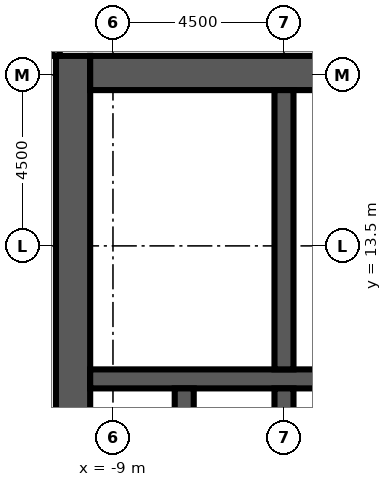
"""IFC4 building model, lengths in metres.
Left out: names, types, materials, properties, quantities, classifications, styles, units other than length and angle.
Written with IfcOpenShell. Run it as: python <this file> out.ifc"""

import sys

from ifc_helpers import new_model, si_unit, direction, frame, frame_2d, origin, place, context, subcontext, project, spatial, rectangle, extrude, element, fill, save


model = new_model("IFC4")
c1 = context("Model", 3, precision=1e-05, world=origin(), true_north=direction((0.0, 1.0)))
c2 = subcontext(c1, "Body", "Model", "MODEL_VIEW")
j1 = project(units=[si_unit("LENGTHUNIT", "METRE"), si_unit("PLANEANGLEUNIT", "RADIAN")], contexts=[c1])
p1 = place(None, origin())
s1 = spatial("IfcSite", under=j1, at=p1, CompositionType="ELEMENT")
p2 = place(p1, origin())
s2 = spatial("IfcBuilding", under=s1, at=p2, CompositionType="ELEMENT")
p3 = place(p2, frame((0.0, 0.0, 141.3)))
s3 = spatial("IfcBuildingStorey", under=s2, at=p3, CompositionType="ELEMENT", Elevation=141.3)
p4 = place(p3, frame((-10.05, -9.0, 0.0), z_axis=(0.0, 0.0, 1.0), x_axis=(0.0, 1.0, 0.0)))
e1 = element("IfcWall", 1, at=p4, inside=s3, PredefinedType="SHEAR", context=c2, shape_type="SweptSolid", body=[
    extrude(rectangle(XDim=27.5, YDim=0.9, at=frame_2d((13.75, 0.0))), origin(), (0.0, 0.0, 1.0), 4.1),
])
p5 = place(p4, frame((12.55, 0.0, 0.0)))
e2 = element("IfcOpeningElement", 2, at=p5, cuts=e1, PredefinedType="OPENING", context=c2, shape_type="SweptSolid", body=[
    extrude(rectangle(XDim=2.4, YDim=2.4, at=frame_2d((1.2, 1.2))), frame((0.0, 0.46, 0.0), z_axis=(0.0, -1.0, 0.0), x_axis=(1.0, 0.0, 0.0)), (0.0, 0.0, 1.0), 0.92),
])
p6 = place(p4, frame((6.825, 0.0, 0.0)))
e3 = element("IfcOpeningElement", 3, at=p6, cuts=e1, PredefinedType="OPENING", context=c2, shape_type="SweptSolid", body=[
    extrude(rectangle(XDim=1.2, YDim=2.1, at=frame_2d((0.6, 1.05))), frame((0.0, 0.46, 0.0), z_axis=(0.0, -1.0, 0.0), x_axis=(1.0, 0.0, 0.0)), (0.0, 0.0, 1.0), 0.92),
])
p7 = place(p4, frame((19.475, 0.0, 0.0)))
e4 = element("IfcOpeningElement", 4, at=p7, cuts=e1, PredefinedType="OPENING", context=c2, shape_type="SweptSolid", body=[
    extrude(rectangle(XDim=1.2, YDim=2.1, at=frame_2d((0.6, 1.05))), frame((0.0, 0.46, 0.0), z_axis=(0.0, -1.0, 0.0), x_axis=(1.0, 0.0, 0.0)), (0.0, 0.0, 1.0), 0.92),
])
p8 = place(p3, frame((-9.6, 18.05, 0.0), z_axis=(0.0, 0.0, 1.0), x_axis=(1.0, 0.0, 0.0)))
e5 = element("IfcWall", 5, at=p8, inside=s3, PredefinedType="SHEAR", context=c2, shape_type="SweptSolid", body=[
    extrude(rectangle(XDim=10.2, YDim=0.9, at=frame_2d((5.1, 0.0))), origin(), (0.0, 0.0, 1.0), 4.1),
])
p9 = place(p3, frame((-9.6, 10.0, 0.0), z_axis=(0.0, 0.0, 1.0), x_axis=(1.0, 0.0, 0.0)))
e6 = element("IfcWall", 6, at=p9, inside=s3, PredefinedType="SHEAR", context=c2, shape_type="SweptSolid", body=[
    extrude(rectangle(XDim=10.2, YDim=0.5, at=frame_2d((5.1, 0.0))), origin(), (0.0, 0.0, 1.0), 4.1),
])
for number, where, z_axis, x_axis in (
    (7, (-7.125, 6.95, 0.0), (0.0, 0.0, 1.0), (0.0, 1.0, 0.0)),
    (8, (-4.5, 6.95, 0.0), (0.0, 0.0, 1.0), (0.0, 1.0, 0.0)),
):
    element("IfcWall", number, at=place(p3, frame(where, z_axis=z_axis, x_axis=x_axis)), inside=s3, PredefinedType="SHEAR", context=c2, shape_type="SweptSolid", body=[
        extrude(rectangle(XDim=2.8, YDim=0.5, at=frame_2d((1.4, 0.0))), origin(), (0.0, 0.0, 1.0), 4.1),
    ])
p10 = place(p3, frame((-4.5, 10.25, 0.0), z_axis=(0.0, 0.0, 1.0), x_axis=(0.0, 1.0, 0.0)))
e9 = element("IfcWall", 9, at=p10, inside=s3, PredefinedType="SHEAR", context=c2, shape_type="SweptSolid", body=[
    extrude(rectangle(XDim=7.35, YDim=0.5, at=frame_2d((3.675, 0.0))), origin(), (0.0, 0.0, 1.0), 4.1),
])
for number, where, z_axis, x_axis in (
    (10, (-4.25, 12.455, 0.0), (0.0, 0.0, 1.0), (1.0, 0.0, 0.0)),
    (11, (-4.25, 15.028, 0.0), (0.0, 0.0, 1.0), (1.0, 0.0, 0.0)),
):
    element("IfcWall", number, at=place(p3, frame(where, z_axis=z_axis, x_axis=x_axis)), inside=s3, PredefinedType="PARTITIONING", context=c2, shape_type="SweptSolid", body=[
        extrude(rectangle(XDim=3.55, YDim=0.1, at=frame_2d((1.775, 0.0))), origin(), (0.0, 0.0, 1.0), 3.5),
    ])
p11 = place(p3, frame((-10.5, 31.35, 0.0), z_axis=(0.0, 0.0, 1.0), x_axis=(0.0, -1.0, 0.0)))
e12 = element("IfcWall", 12, at=p11, inside=s3, PredefinedType="PARTITIONING", context=c2, shape_type="SweptSolid", body=[
    extrude(rectangle(XDim=12.85, YDim=0.2, at=frame_2d((6.425, 0.0))), origin(), (0.0, 0.0, 1.0), 3.5),
])
p12 = place(p11, frame((6.75, 0.0, 0.0)))
e13 = element("IfcOpeningElement", 13, at=p12, cuts=e12, PredefinedType="OPENING", context=c2, shape_type="SweptSolid", body=[
    extrude(rectangle(XDim=1.0, YDim=2.1, at=frame_2d((0.5, 1.05))), frame((0.0, 0.11, 0.0), z_axis=(0.0, -1.0, 0.0), x_axis=(1.0, 0.0, 0.0)), (0.0, 0.0, 1.0), 0.22),
])
p13 = place(p7, origin())
e14 = element("IfcDoor", 14, at=p13, inside=s3, OperationType="SINGLE_SWING_LEFT", PredefinedType="DOOR", context=c2, shape_type="SweptSolid", body=[
    extrude(rectangle(XDim=1.2, YDim=2.1, at=frame_2d((0.6, 1.05))), frame((0.0, 0.025, 0.0), z_axis=(0.0, -1.0, 0.0), x_axis=(1.0, 0.0, 0.0)), (0.0, 0.0, 1.0), 0.05),
])
fill(e4, e14)
save(model, sys.argv[1])
